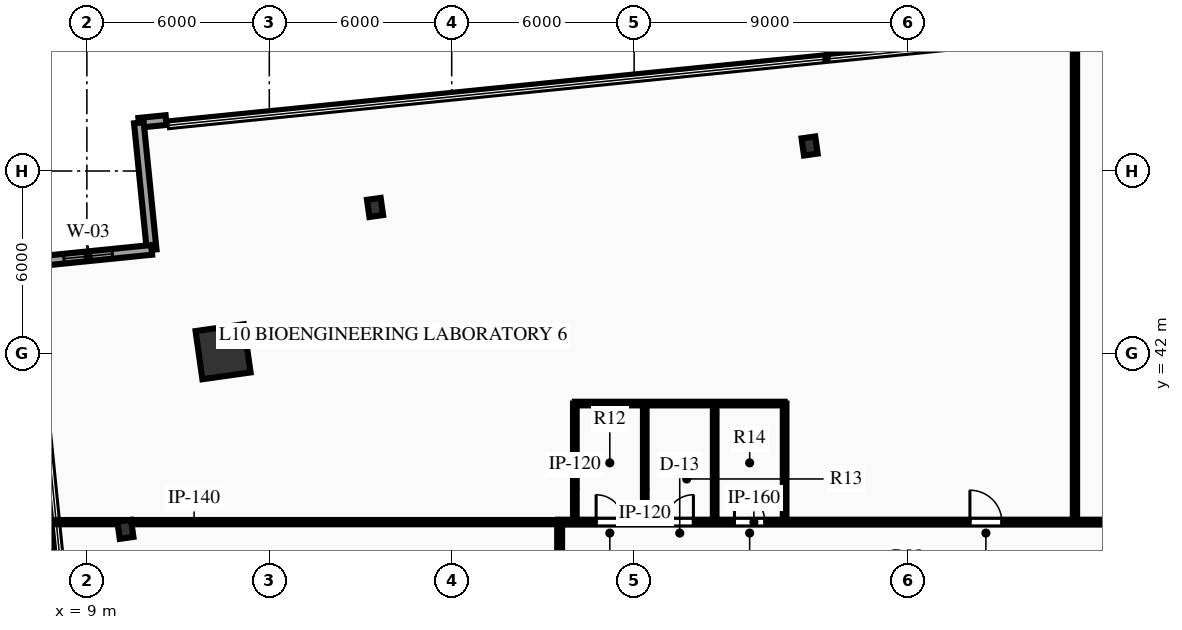
"""IFC4 building model, lengths in metres.
Left out: names, types, materials, properties, quantities, classifications, styles, units other than length and angle.
Written with IfcOpenShell. Run it as: python <this file> out.ifc"""

import sys

from ifc_helpers import new_model, si_unit, direction, frame, frame_2d, origin, origin_2d, place, context, subcontext, project, spatial, rectangle, hollow_rectangle, i_section, extrude, element, fill, save


model = new_model("IFC4")
c1 = context("Model", 3, precision=1e-05, world=origin(), true_north=direction((0.0, 1.0)))
c2 = subcontext(c1, "Body", "Model", "MODEL_VIEW")
j1 = project(units=[si_unit("LENGTHUNIT", "METRE"), si_unit("PLANEANGLEUNIT", "RADIAN")], contexts=[c1])
p1 = place(None, origin())
s1 = spatial("IfcSite", under=j1, at=p1, CompositionType="ELEMENT")
p2 = place(p1, origin())
s2 = spatial("IfcBuilding", under=s1, at=p2, CompositionType="ELEMENT")
p3 = place(p2, frame((0.0, 0.0, 47.7)))
s3 = spatial("IfcBuildingStorey", under=s2, at=p3, CompositionType="ELEMENT", Elevation=47.7)
p4 = place(p3, frame((13.48, 42.054, 0.0), z_axis=(0.0, 0.0, 1.0), x_axis=(0.990146240249, 0.140037219771, 0.0)))
e1 = element("IfcColumn", 1, at=p4, inside=s3, PredefinedType="COLUMN", context=c2, shape_type="SweptSolid", body=[
    extrude(hollow_rectangle(XDim=1.6, YDim=1.6, WallThickness=0.08, at=origin_2d()), origin(), (0.0, 0.0, 1.0), 3.75),
])
for number, where, z_axis, x_axis in (
    (2, (32.772, 48.823, 0.0), (0.0, 0.0, 1.0), (0.99, 0.14, 0.0)),
    (3, (18.479, 46.801, 0.0), (0.0, 0.0, 1.0), (0.99, 0.14, 0.0)),
    (4, (10.266, 36.213, 0.0), (0.0, 0.0, 1.0), (0.99, 0.14, 0.0)),
):
    element("IfcColumn", number, at=place(p3, frame(where, z_axis=z_axis, x_axis=x_axis)), inside=s3, PredefinedType="COLUMN", context=c2, shape_type="SweptSolid", body=[
        extrude(i_section(OverallWidth=0.454, OverallDepth=0.569, WebThickness=0.078, FlangeThickness=0.125, at=origin_2d()), origin(), (0.0, 0.0, 1.0), 3.75),
    ])
p5 = place(p3, frame((10.71, 49.585, 0.0), z_axis=(0.0, 0.0, 1.0), x_axis=(0.994977928667, 0.100094562617, 0.0)))
e5 = element("IfcWall", 5, at=p5, inside=s3, PredefinedType="STANDARD", context=c2, shape_type="SweptSolid", body=[
    extrude(rectangle(XDim=0.9, YDim=0.32, at=frame_2d((0.45, 0.0))), origin(), (0.0, 0.0, 1.0), 3.44),
])
p6 = place(p3, frame((11.131, 45.406, 0.0), z_axis=(0.0, 0.0, 1.0), x_axis=(-0.100211581584, 0.994966149633, 0.0)))
e6 = element("IfcWall", 6, at=p6, inside=s3, PredefinedType="STANDARD", context=c2, shape_type="SweptSolid", body=[
    extrude(rectangle(XDim=4.2, YDim=0.32, at=frame_2d((2.1, 0.0))), origin(), (0.0, 0.0, 1.0), 3.44),
])
p7 = place(p3, frame((6.952, 44.985, 0.0), z_axis=(0.0, 0.0, 1.0), x_axis=(0.994965565847, 0.10021737763, 0.0)))
e7 = element("IfcWall", 7, at=p7, inside=s3, PredefinedType="STANDARD", context=c2, shape_type="SweptSolid", body=[
    extrude(rectangle(XDim=4.2, YDim=0.32, at=frame_2d((2.1, 0.0))), origin(), (0.0, 0.0, 1.0), 3.44),
])
p8 = place(p7, frame((1.3, 0.0, 0.85)))
e8 = element("IfcOpeningElement", 8, at=p8, cuts=e7, PredefinedType="OPENING", context=c2, shape_type="SweptSolid", body=[
    extrude(rectangle(XDim=1.6, YDim=2.1, at=frame_2d((0.8, 1.05))), frame((0.0, 0.17, 0.0), z_axis=(0.0, -1.0, 0.0), x_axis=(1.0, 0.0, 0.0)), (0.0, 0.0, 1.0), 0.34),
])
p9 = place(p3, frame((24.5, 36.45, 0.0), z_axis=(0.0, 0.0, 1.0), x_axis=(1.0, 0.0, 0.0)))
e9 = element("IfcWall", 9, at=p9, inside=s3, PredefinedType="PARTITIONING", context=c2, shape_type="SweptSolid", body=[
    extrude(rectangle(XDim=23.0, YDim=0.16, at=frame_2d((11.5, 0.0))), origin(), (0.0, 0.0, 1.0), 3.44),
])
p10 = place(p9, frame((1.25, 0.0, 0.0)))
e10 = element("IfcOpeningElement", 10, at=p10, cuts=e9, PredefinedType="OPENING", context=c2, shape_type="SweptSolid", body=[
    extrude(rectangle(XDim=0.9, YDim=2.15, at=frame_2d((0.45, 1.075))), frame((0.0, 0.09, 0.0), z_axis=(0.0, -1.0, 0.0), x_axis=(1.0, 0.0, 0.0)), (0.0, 0.0, 1.0), 0.18),
])
p11 = place(p9, frame((3.55, 0.0, 0.0)))
e11 = element("IfcOpeningElement", 11, at=p11, cuts=e9, PredefinedType="OPENING", context=c2, shape_type="SweptSolid", body=[
    extrude(rectangle(XDim=0.9, YDim=2.15, at=frame_2d((0.45, 1.075))), frame((0.0, 0.09, 0.0), z_axis=(0.0, -1.0, 0.0), x_axis=(1.0, 0.0, 0.0)), (0.0, 0.0, 1.0), 0.18),
])
p12 = place(p9, frame((5.8, 0.0, 0.0)))
e12 = element("IfcOpeningElement", 12, at=p12, cuts=e9, PredefinedType="OPENING", context=c2, shape_type="SweptSolid", body=[
    extrude(rectangle(XDim=1.0, YDim=2.15, at=frame_2d((0.5, 1.075))), frame((0.0, 0.09, 0.0), z_axis=(0.0, -1.0, 0.0), x_axis=(1.0, 0.0, 0.0)), (0.0, 0.0, 1.0), 0.18),
])
p13 = place(p9, frame((13.545, 0.0, 0.0)))
e13 = element("IfcOpeningElement", 13, at=p13, cuts=e9, PredefinedType="OPENING", context=c2, shape_type="SweptSolid", body=[
    extrude(rectangle(XDim=1.05, YDim=2.15, at=frame_2d((0.525, 1.075))), frame((0.0, 0.09, 0.0), z_axis=(0.0, -1.0, 0.0), x_axis=(1.0, 0.0, 0.0)), (0.0, 0.0, 1.0), 0.18),
])
p14 = place(p9, frame((18.169, 0.0, 0.0)))
e14 = element("IfcOpeningElement", 14, at=p14, cuts=e9, PredefinedType="OPENING", context=c2, shape_type="SweptSolid", body=[
    extrude(rectangle(XDim=1.05, YDim=2.15, at=frame_2d((0.525, 1.075))), frame((0.0, 0.09, 0.0), z_axis=(0.0, -1.0, 0.0), x_axis=(1.0, 0.0, 0.0)), (0.0, 0.0, 1.0), 0.18),
])
p15 = place(p3, frame((24.55, 15.55, 0.0), z_axis=(0.0, 0.0, 1.0), x_axis=(0.0, 1.0, 0.0)))
e15 = element("IfcWall", 15, at=p15, inside=s3, PredefinedType="PARTITIONING", context=c2, shape_type="SweptSolid", body=[
    extrude(rectangle(XDim=20.9, YDim=0.16, at=frame_2d((10.45, 0.0))), origin(), (0.0, 0.0, 1.0), 3.44),
])
p16 = place(p15, frame((5.075, 0.0, 0.0)))
e16 = element("IfcOpeningElement", 16, at=p16, cuts=e15, PredefinedType="OPENING", context=c2, shape_type="SweptSolid", body=[
    extrude(rectangle(XDim=0.95, YDim=2.15, at=frame_2d((0.475, 1.075))), frame((0.0, 0.09, 0.0), z_axis=(0.0, -1.0, 0.0), x_axis=(1.0, 0.0, 0.0)), (0.0, 0.0, 1.0), 0.18),
])
p17 = place(p15, frame((15.563, 0.0, 0.0)))
e17 = element("IfcOpeningElement", 17, at=p17, cuts=e15, PredefinedType="OPENING", context=c2, shape_type="SweptSolid", body=[
    extrude(rectangle(XDim=1.05, YDim=2.15, at=frame_2d((0.525, 1.075))), frame((0.0, 0.09, 0.0), z_axis=(0.0, -1.0, 0.0), x_axis=(1.0, 0.0, 0.0)), (0.0, 0.0, 1.0), 0.18),
])
for number, where, z_axis, x_axis in (
    (18, (25.05, 36.45, 0.0), (0.0, 0.0, 1.0), (0.0, 1.0, 0.0)),
    (19, (27.35, 36.45, 0.0), (0.0, 0.0, 1.0), (0.0, 1.0, 0.0)),
    (20, (29.65, 36.45, 0.0), (0.0, 0.0, 1.0), (0.0, 1.0, 0.0)),
    (21, (31.95, 36.45, 0.0), (0.0, 0.0, 1.0), (0.0, 1.0, 0.0)),
):
    element("IfcWall", number, at=place(p3, frame(where, z_axis=z_axis, x_axis=x_axis)), inside=s3, PredefinedType="PARTITIONING", context=c2, shape_type="SweptSolid", body=[
        extrude(rectangle(XDim=3.9, YDim=0.12, at=frame_2d((1.95, 0.0))), origin(), (0.0, 0.0, 1.0), 3.44),
    ])
p18 = place(p3, frame((25.05, 40.35, 0.0), z_axis=(0.0, 0.0, 1.0), x_axis=(1.0, 0.0, 0.0)))
e22 = element("IfcWall", 22, at=p18, inside=s3, PredefinedType="PARTITIONING", context=c2, shape_type="SweptSolid", body=[
    extrude(rectangle(XDim=6.9, YDim=0.12, at=frame_2d((3.45, 0.0))), origin(), (0.0, 0.0, 1.0), 3.44),
])
p19 = place(p3, frame((7.852, 36.45, 0.0), z_axis=(0.0, 0.0, 1.0), x_axis=(1.0, 0.0, 0.0)))
e23 = element("IfcWall", 23, at=p19, inside=s3, PredefinedType="PARTITIONING", context=c2, shape_type="SweptSolid", body=[
    extrude(rectangle(XDim=16.698, YDim=0.14, at=frame_2d((8.349, 0.0))), origin(), (0.0, 0.0, 1.0), 2.739),
])
p20 = place(p3, frame((41.5, 36.45, 0.0), z_axis=(0.0, 0.0, 1.0), x_axis=(0.0, 1.0, 0.0)))
e24 = element("IfcWall", 24, at=p20, inside=s3, PredefinedType="PARTITIONING", context=c2, shape_type="SweptSolid", body=[
    extrude(rectangle(XDim=16.195, YDim=0.14, at=frame_2d((8.098, 0.0))), origin(), (0.0, 0.0, 1.0), 3.44),
])
p21 = place(p8, origin())
e25 = element("IfcWindow", 25, at=p21, inside=s3, PartitioningType="SINGLE_PANEL", PredefinedType="WINDOW", context=c2, shape_type="SweptSolid", body=[
    extrude(rectangle(XDim=1.6, YDim=2.1, at=frame_2d((0.8, 1.05))), frame((0.0, 0.03, 0.0), z_axis=(0.0, -1.0, 0.0), x_axis=(1.0, 0.0, 0.0)), (0.0, 0.0, 1.0), 0.06),
])
fill(e8, e25)
p22 = place(p10, origin())
e26 = element("IfcDoor", 26, at=p22, inside=s3, OperationType="SINGLE_SWING_LEFT", PredefinedType="DOOR", context=c2, shape_type="SweptSolid", body=[
    extrude(rectangle(XDim=0.9, YDim=2.15, at=frame_2d((0.45, 1.075))), frame((0.0, 0.025, 0.0), z_axis=(0.0, -1.0, 0.0), x_axis=(1.0, 0.0, 0.0)), (0.0, 0.0, 1.0), 0.05),
])
fill(e10, e26)
p23 = place(p11, origin())
e27 = element("IfcDoor", 27, at=p23, inside=s3, OperationType="SINGLE_SWING_RIGHT", PredefinedType="DOOR", context=c2, shape_type="SweptSolid", body=[
    extrude(rectangle(XDim=0.9, YDim=2.15, at=frame_2d((0.45, 1.075))), frame((0.0, 0.025, 0.0), z_axis=(0.0, -1.0, 0.0), x_axis=(1.0, 0.0, 0.0)), (0.0, 0.0, 1.0), 0.05),
])
fill(e11, e27)
p24 = place(p12, origin())
e28 = element("IfcDoor", 28, at=p24, inside=s3, OperationType="SINGLE_SWING_LEFT", PredefinedType="DOOR", context=c2, shape_type="SweptSolid", body=[
    extrude(rectangle(XDim=1.0, YDim=2.15, at=frame_2d((0.5, 1.075))), frame((0.0, 0.025, 0.0), z_axis=(0.0, -1.0, 0.0), x_axis=(1.0, 0.0, 0.0)), (0.0, 0.0, 1.0), 0.05),
])
fill(e12, e28)
p25 = place(p13, origin())
e29 = element("IfcDoor", 29, at=p25, inside=s3, OperationType="SINGLE_SWING_LEFT", PredefinedType="DOOR", context=c2, shape_type="SweptSolid", body=[
    extrude(rectangle(XDim=1.05, YDim=2.15, at=frame_2d((0.525, 1.075))), frame((0.0, 0.025, 0.0), z_axis=(0.0, -1.0, 0.0), x_axis=(1.0, 0.0, 0.0)), (0.0, 0.0, 1.0), 0.05),
])
fill(e13, e29)
save(model, sys.argv[1])
